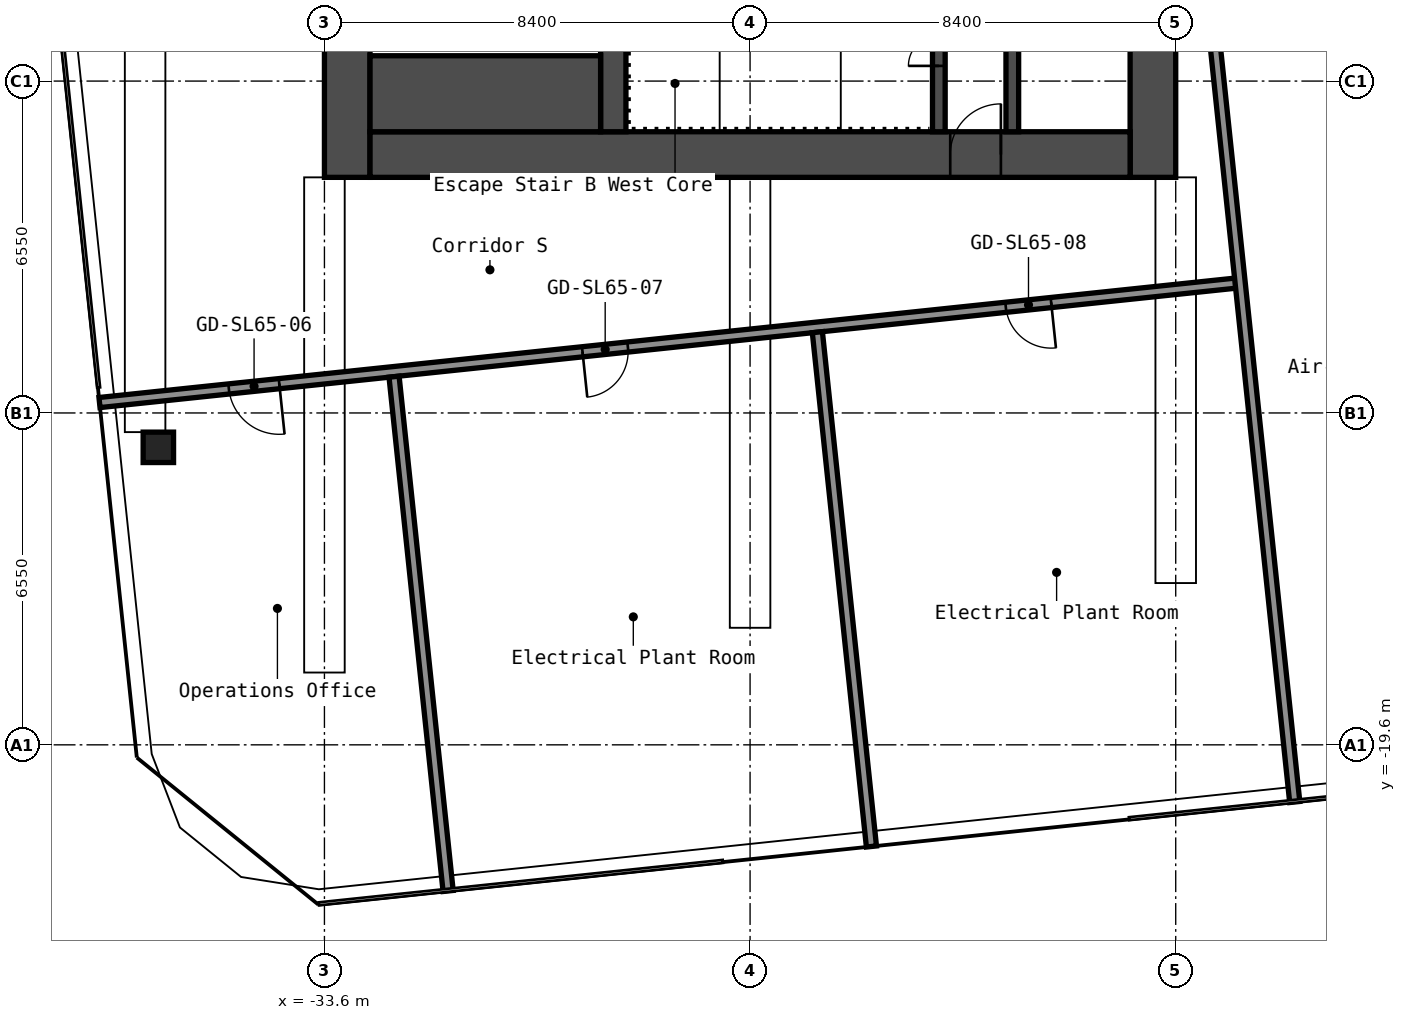
"""IFC4 building model, lengths in metres.
Left out: names, types, materials, properties, quantities, classifications, styles, units other than length and angle.
Written with IfcOpenShell. Run it as: python <this file> out.ifc"""

import sys

from ifc_helpers import new_model, si_unit, direction, frame, frame_2d, origin, origin_2d, place, context, subcontext, project, spatial, rectangle, hollow_rectangle, extrude, element, fill, save


model = new_model("IFC4")
c1 = context("Model", 3, precision=1e-05, world=origin(), true_north=direction((0.0, 1.0)))
c2 = subcontext(c1, "Body", "Model", "MODEL_VIEW")
j1 = project(units=[si_unit("LENGTHUNIT", "METRE"), si_unit("PLANEANGLEUNIT", "RADIAN")], contexts=[c1])
p1 = place(None, origin())
s1 = spatial("IfcSite", under=j1, at=p1, CompositionType="ELEMENT")
p2 = place(p1, origin())
s2 = spatial("IfcBuilding", under=s1, at=p2, CompositionType="ELEMENT")
p3 = place(p2, frame((0.0, 0.0, 228.2)))
s3 = spatial("IfcBuildingStorey", under=s2, at=p3, CompositionType="ELEMENT", Elevation=228.2)
p4 = place(p3, frame((-36.878, -13.729, 0.0), z_axis=(0.0, 0.0, 1.0), x_axis=(1.0, 0.0, 0.0)))
e1 = element("IfcColumn", 1, at=p4, inside=s3, PredefinedType="COLUMN", context=c2, shape_type="SweptSolid", body=[
    extrude(hollow_rectangle(XDim=0.6, YDim=0.6, WallThickness=0.025, InnerFilletRadius=0.038, OuterFilletRadius=0.062, at=origin_2d()), origin(), (0.0, 0.0, 1.0), 4.1),
])
p5 = place(p3, frame((-17.25, -8.4, 0.0), z_axis=(0.0, 0.0, 1.0), x_axis=(0.0, 1.0, 0.0)))
e2 = element("IfcWall", 2, at=p5, inside=s3, PredefinedType="SHEAR", context=c2, shape_type="SweptSolid", body=[
    extrude(rectangle(XDim=16.8, YDim=0.9, at=frame_2d((8.4, 0.0))), origin(), (0.0, 0.0, 1.0), 4.1),
])
p6 = place(p5, frame((8.321, 0.0, 0.0)))
e3 = element("IfcOpeningElement", 3, at=p6, cuts=e2, PredefinedType="OPENING", context=c2, shape_type="SweptSolid", body=[
    extrude(rectangle(XDim=1.6, YDim=2.1, at=frame_2d((0.8, 1.05))), frame((0.0, 0.46, 0.0), z_axis=(0.0, -1.0, 0.0), x_axis=(1.0, 0.0, 0.0)), (0.0, 0.0, 1.0), 0.92),
])
p7 = place(p3, frame((-33.15, -8.4, 0.0), z_axis=(0.0, 0.0, 1.0), x_axis=(0.0, 1.0, 0.0)))
e4 = element("IfcWall", 4, at=p7, inside=s3, PredefinedType="SHEAR", context=c2, shape_type="SweptSolid", body=[
    extrude(rectangle(XDim=16.8, YDim=0.9, at=frame_2d((8.4, 0.0))), origin(), (0.0, 0.0, 1.0), 4.1),
])
p8 = place(p3, frame((-32.7, -7.95, 0.0), z_axis=(0.0, 0.0, 1.0), x_axis=(1.0, 0.0, 0.0)))
e5 = element("IfcWall", 5, at=p8, inside=s3, PredefinedType="SHEAR", context=c2, shape_type="SweptSolid", body=[
    extrude(rectangle(XDim=15.0, YDim=0.9, at=frame_2d((7.5, 0.0))), origin(), (0.0, 0.0, 1.0), 4.1),
])
p9 = place(p8, frame((11.45, 0.0, 0.0)))
e6 = element("IfcOpeningElement", 6, at=p9, cuts=e5, PredefinedType="OPENING", context=c2, shape_type="SweptSolid", body=[
    extrude(rectangle(XDim=1.0, YDim=2.1, at=frame_2d((0.5, 1.05))), frame((0.0, 0.46, 0.0), z_axis=(0.0, -1.0, 0.0), x_axis=(1.0, 0.0, 0.0)), (0.0, 0.0, 1.0), 0.92),
])
p10 = place(p3, frame((-20.025, -7.5, 0.0), z_axis=(0.0, 0.0, 1.0), x_axis=(0.0, 1.0, 0.0)))
e7 = element("IfcWall", 7, at=p10, inside=s3, PredefinedType="SHEAR", context=c2, shape_type="SweptSolid", body=[
    extrude(rectangle(XDim=6.3, YDim=0.25, at=frame_2d((3.15, 0.0))), origin(), (0.0, 0.0, 1.0), 4.1),
])
p11 = place(p10, frame((2.4, 0.0, 0.0)))
e8 = element("IfcOpeningElement", 8, at=p11, cuts=e7, PredefinedType="OPENING", context=c2, shape_type="SweptSolid", body=[
    extrude(rectangle(XDim=1.0, YDim=2.1, at=frame_2d((0.5, 1.05))), frame((0.0, 0.135, 0.0), z_axis=(0.0, -1.0, 0.0), x_axis=(1.0, 0.0, 0.0)), (0.0, 0.0, 1.0), 0.27),
])
p12 = place(p3, frame((-21.475, -7.5, 0.0), z_axis=(0.0, 0.0, 1.0), x_axis=(0.0, 1.0, 0.0)))
e9 = element("IfcWall", 9, at=p12, inside=s3, PredefinedType="SHEAR", context=c2, shape_type="SweptSolid", body=[
    extrude(rectangle(XDim=3.75, YDim=0.25, at=frame_2d((1.875, 0.0))), origin(), (0.0, 0.0, 1.0), 4.1),
])
p13 = place(p12, frame((1.3, 0.0, 0.0)))
e10 = element("IfcOpeningElement", 10, at=p13, cuts=e9, PredefinedType="OPENING", context=c2, shape_type="SweptSolid", body=[
    extrude(rectangle(XDim=1.2, YDim=2.1, at=frame_2d((0.6, 1.05))), frame((0.0, 0.135, 0.0), z_axis=(0.0, -1.0, 0.0), x_axis=(1.0, 0.0, 0.0)), (0.0, 0.0, 1.0), 0.27),
])
p14 = place(p3, frame((-27.9, -7.5, 0.0), z_axis=(0.0, 0.0, 1.0), x_axis=(0.0, 1.0, 0.0)))
e11 = element("IfcWall", 11, at=p14, inside=s3, PredefinedType="SHEAR", context=c2, shape_type="SweptSolid", body=[
    extrude(rectangle(XDim=3.75, YDim=0.5, at=frame_2d((1.875, 0.0))), origin(), (0.0, 0.0, 1.0), 4.1),
])
p15 = place(p3, frame((-32.7, -6.75, 0.0), z_axis=(0.0, 0.0, 1.0), x_axis=(1.0, 0.0, 0.0)))
e12 = element("IfcWall", 12, at=p15, inside=s3, PredefinedType="SHEAR", context=c2, shape_type="SweptSolid", body=[
    extrude(rectangle(XDim=4.55, YDim=1.5, at=frame_2d((2.275, 0.0))), origin(), (0.0, 0.0, 1.0), 4.1),
])
p16 = place(p3, frame((-38.039, -12.844, 0.0), z_axis=(0.0, 0.0, 1.0), x_axis=(0.994521812173, 0.104529254816, 0.0)))
e13 = element("IfcWall", 13, at=p16, inside=s3, PredefinedType="PARTITIONING", context=c2, shape_type="SweptSolid", body=[
    extrude(rectangle(XDim=22.635, YDim=0.2, at=frame_2d((11.317, 0.0))), origin(), (0.0, 0.0, 1.0), 4.1),
])
p17 = place(p16, frame((2.567, 0.0, 0.0)))
e14 = element("IfcOpeningElement", 14, at=p17, cuts=e13, PredefinedType="OPENING", context=c2, shape_type="SweptSolid", body=[
    extrude(rectangle(XDim=1.0, YDim=2.1, at=frame_2d((0.5, 1.05))), frame((0.0, 0.11, 0.0), z_axis=(0.0, -1.0, 0.0), x_axis=(1.0, 0.0, 0.0)), (0.0, 0.0, 1.0), 0.22),
])
p18 = place(p16, frame((9.585, 0.0, 0.0)))
e15 = element("IfcOpeningElement", 15, at=p18, cuts=e13, PredefinedType="OPENING", context=c2, shape_type="SweptSolid", body=[
    extrude(rectangle(XDim=0.9, YDim=2.1, at=frame_2d((0.45, 1.05))), frame((0.0, 0.11, 0.0), z_axis=(0.0, -1.0, 0.0), x_axis=(1.0, 0.0, 0.0)), (0.0, 0.0, 1.0), 0.22),
])
p19 = place(p16, frame((17.985, 0.0, 0.0)))
e16 = element("IfcOpeningElement", 16, at=p19, cuts=e13, PredefinedType="OPENING", context=c2, shape_type="SweptSolid", body=[
    extrude(rectangle(XDim=0.9, YDim=2.1, at=frame_2d((0.45, 1.05))), frame((0.0, 0.11, 0.0), z_axis=(0.0, -1.0, 0.0), x_axis=(1.0, 0.0, 0.0)), (0.0, 0.0, 1.0), 0.22),
])
p20 = place(p3, frame((-31.159, -22.484, 0.0), z_axis=(0.0, 0.0, 1.0), x_axis=(-0.104532871322, 0.994521432053, 0.0)))
e17 = element("IfcWall", 17, at=p20, inside=s3, PredefinedType="PARTITIONING", context=c2, shape_type="SweptSolid", body=[
    extrude(rectangle(XDim=10.206, YDim=0.2, at=frame_2d((5.103, 0.0))), origin(), (0.0, 0.0, 1.0), 4.1),
])
p21 = place(p3, frame((-22.805, -21.606, 0.0), z_axis=(0.0, 0.0, 1.0), x_axis=(-0.104535358167, 0.994521170661, 0.0)))
e18 = element("IfcWall", 18, at=p21, inside=s3, PredefinedType="PARTITIONING", context=c2, shape_type="SweptSolid", body=[
    extrude(rectangle(XDim=10.206, YDim=0.2, at=frame_2d((5.103, 0.0))), origin(), (0.0, 0.0, 1.0), 4.1),
])
p22 = place(p3, frame((-14.451, -20.728, 0.0), z_axis=(0.0, 0.0, 1.0), x_axis=(-0.104522387243, 0.994522533965, 0.0)))
e19 = element("IfcWall", 19, at=p22, inside=s3, PredefinedType="PARTITIONING", context=c2, shape_type="SweptSolid", body=[
    extrude(rectangle(XDim=20.19, YDim=0.2, at=frame_2d((10.095, 0.0))), origin(), (0.0, 0.0, 1.0), 4.1),
])
p23 = place(p9, origin())
e20 = element("IfcDoor", 20, at=p23, inside=s3, OperationType="SINGLE_SWING_LEFT", PredefinedType="DOOR", context=c2, shape_type="SweptSolid", body=[
    extrude(rectangle(XDim=1.0, YDim=2.1, at=frame_2d((0.5, 1.05))), frame((0.0, 0.025, 0.0), z_axis=(0.0, -1.0, 0.0), x_axis=(1.0, 0.0, 0.0)), (0.0, 0.0, 1.0), 0.05),
])
fill(e6, e20)
p24 = place(p13, origin())
e21 = element("IfcDoor", 21, at=p24, inside=s3, OperationType="DOUBLE_DOOR_SINGLE_SWING", PredefinedType="DOOR", context=c2, shape_type="SweptSolid", body=[
    extrude(rectangle(XDim=1.2, YDim=2.1, at=frame_2d((0.6, 1.05))), frame((0.0, 0.025, 0.0), z_axis=(0.0, -1.0, 0.0), x_axis=(1.0, 0.0, 0.0)), (0.0, 0.0, 1.0), 0.05),
])
fill(e10, e21)
p25 = place(p17, origin())
e22 = element("IfcDoor", 22, at=p25, inside=s3, OperationType="SINGLE_SWING_RIGHT", PredefinedType="DOOR", context=c2, shape_type="SweptSolid", body=[
    extrude(rectangle(XDim=1.0, YDim=2.1, at=frame_2d((0.5, 1.05))), frame((0.0, 0.025, 0.0), z_axis=(0.0, -1.0, 0.0), x_axis=(1.0, 0.0, 0.0)), (0.0, 0.0, 1.0), 0.05),
])
fill(e14, e22)
p26 = place(p18, origin())
e23 = element("IfcDoor", 23, at=p26, inside=s3, OperationType="SINGLE_SWING_LEFT", PredefinedType="DOOR", context=c2, shape_type="SweptSolid", body=[
    extrude(rectangle(XDim=0.9, YDim=2.1, at=frame_2d((0.45, 1.05))), frame((0.0, 0.025, 0.0), z_axis=(0.0, -1.0, 0.0), x_axis=(1.0, 0.0, 0.0)), (0.0, 0.0, 1.0), 0.05),
])
fill(e15, e23)
p27 = place(p19, origin())
e24 = element("IfcDoor", 24, at=p27, inside=s3, OperationType="SINGLE_SWING_RIGHT", PredefinedType="DOOR", context=c2, shape_type="SweptSolid", body=[
    extrude(rectangle(XDim=0.9, YDim=2.1, at=frame_2d((0.45, 1.05))), frame((0.0, 0.025, 0.0), z_axis=(0.0, -1.0, 0.0), x_axis=(1.0, 0.0, 0.0)), (0.0, 0.0, 1.0), 0.05),
])
fill(e16, e24)
save(model, sys.argv[1])
